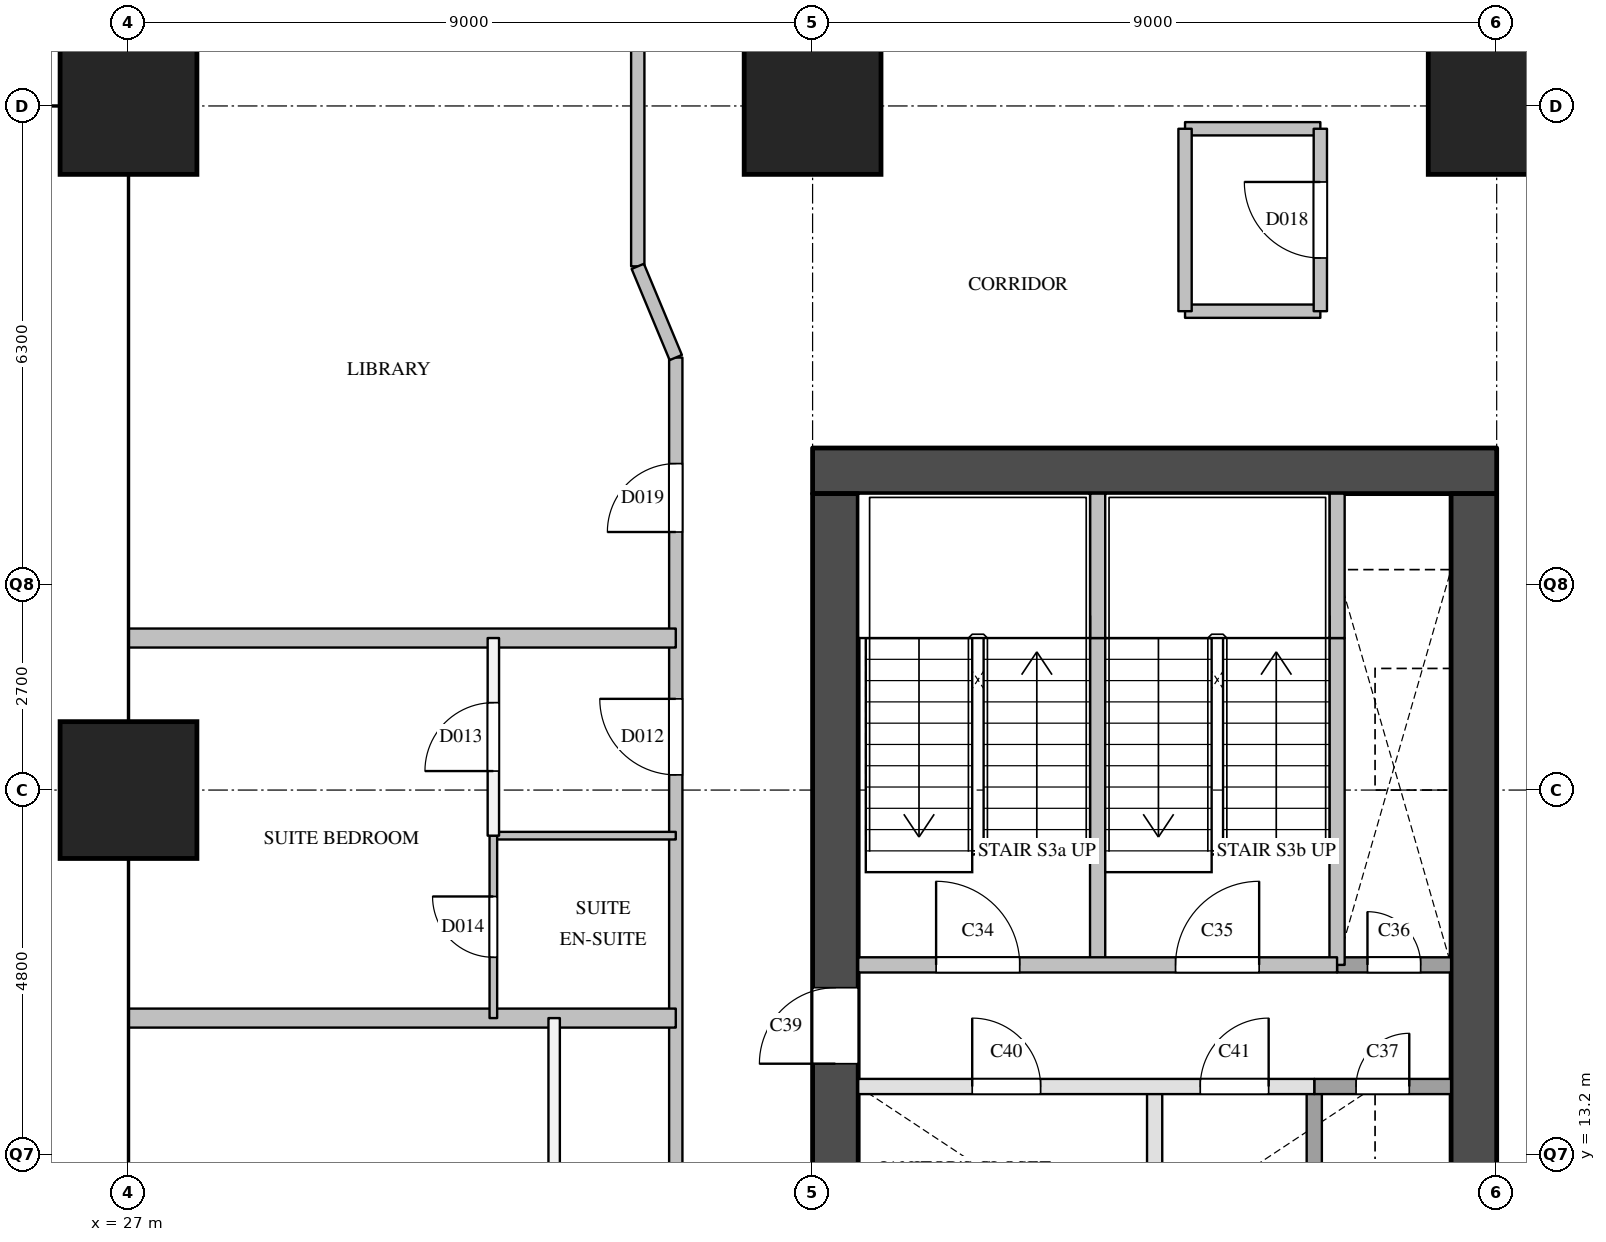
"""IFC4 building model, lengths in metres.
Left out: names, types, materials, properties, quantities, classifications, styles, units other than length and angle.
Written with IfcOpenShell. Run it as: python <this file> out.ifc"""

import sys

from ifc_helpers import new_model, si_unit, direction, frame, frame_2d, origin, origin_2d, place, context, subcontext, project, spatial, rectangle, extrude, element, fill, save


model = new_model("IFC4")
c1 = context("Model", 3, precision=1e-05, world=origin(), true_north=direction((0.0, 1.0)))
c2 = subcontext(c1, "Body", "Model", "MODEL_VIEW")
j1 = project(units=[si_unit("LENGTHUNIT", "METRE"), si_unit("PLANEANGLEUNIT", "RADIAN")], contexts=[c1])
p1 = place(None, origin())
s1 = spatial("IfcSite", under=j1, at=p1, CompositionType="ELEMENT")
p2 = place(p1, origin())
s2 = spatial("IfcBuilding", under=s1, at=p2, CompositionType="ELEMENT")
p3 = place(p2, frame((0.0, 0.0, 119.6)))
s3 = spatial("IfcBuildingStorey", under=s2, at=p3, CompositionType="ELEMENT", Elevation=119.6)
for number, where, z_axis, x_axis in (
    (1, (27.0, 18.0, 0.0), (0.0, 0.0, 1.0), (1.0, 0.0, 0.0)),
    (2, (27.0, 27.0, 0.0), (0.0, 0.0, 1.0), (1.0, 0.0, 0.0)),
    (3, (36.0, 27.0, 0.0), (0.0, 0.0, 1.0), (1.0, 0.0, 0.0)),
    (4, (45.0, 27.0, 0.0), (0.0, 0.0, 1.0), (1.0, 0.0, 0.0)),
):
    element("IfcColumn", number, at=place(p3, frame(where, z_axis=z_axis, x_axis=x_axis)), inside=s3, PredefinedType="COLUMN", context=c2, shape_type="SweptSolid", body=[
        extrude(rectangle(XDim=1.8, YDim=1.8, at=origin_2d()), origin(), (0.0, 0.0, 1.0), 3.8),
    ])
p4 = place(p3, frame((36.0, 22.2, 0.0), z_axis=(0.0, 0.0, 1.0), x_axis=(1.0, 0.0, 0.0)))
e5 = element("IfcWall", 5, at=p4, inside=s3, PredefinedType="SHEAR", context=c2, shape_type="SweptSolid", body=[
    extrude(rectangle(XDim=9.0, YDim=0.6, at=frame_2d((4.5, 0.0))), origin(), (0.0, 0.0, 1.0), 3.3),
])
p5 = place(p3, frame((36.3, 9.6, 0.0), z_axis=(0.0, 0.0, 1.0), x_axis=(0.0, 1.0, 0.0)))
e6 = element("IfcWall", 6, at=p5, inside=s3, PredefinedType="SHEAR", context=c2, shape_type="SweptSolid", body=[
    extrude(rectangle(XDim=12.3, YDim=0.6, at=frame_2d((6.15, 0.0))), origin(), (0.0, 0.0, 1.0), 3.3),
])
p6 = place(p5, frame((0.525, 0.0, 0.0)))
e7 = element("IfcOpeningElement", 7, at=p6, cuts=e6, PredefinedType="OPENING", context=c2, shape_type="SweptSolid", body=[
    extrude(rectangle(XDim=1.2, YDim=2.1, at=frame_2d((0.6, 1.05))), frame((0.0, 0.31, 0.0), z_axis=(0.0, -1.0, 0.0), x_axis=(1.0, 0.0, 0.0)), (0.0, 0.0, 1.0), 0.62),
])
p7 = place(p5, frame((4.8, 0.0, 0.0)))
e8 = element("IfcOpeningElement", 8, at=p7, cuts=e6, PredefinedType="OPENING", context=c2, shape_type="SweptSolid", body=[
    extrude(rectangle(XDim=1.0, YDim=2.1, at=frame_2d((0.5, 1.05))), frame((0.0, 0.31, 0.0), z_axis=(0.0, -1.0, 0.0), x_axis=(1.0, 0.0, 0.0)), (0.0, 0.0, 1.0), 0.62),
])
p8 = place(p3, frame((44.7, 9.6, 0.0), z_axis=(0.0, 0.0, 1.0), x_axis=(0.0, 1.0, 0.0)))
e9 = element("IfcWall", 9, at=p8, inside=s3, PredefinedType="SHEAR", context=c2, shape_type="SweptSolid", body=[
    extrude(rectangle(XDim=12.3, YDim=0.6, at=frame_2d((6.15, 0.0))), origin(), (0.0, 0.0, 1.0), 3.3),
])
p9 = place(p8, frame((0.8, 0.0, 0.0)))
e10 = element("IfcOpeningElement", 10, at=p9, cuts=e9, PredefinedType="OPENING", context=c2, shape_type="SweptSolid", body=[
    extrude(rectangle(XDim=0.7, YDim=2.1, at=frame_2d((0.35, 1.05))), frame((0.0, 0.31, 0.0), z_axis=(0.0, -1.0, 0.0), x_axis=(1.0, 0.0, 0.0)), (0.0, 0.0, 1.0), 0.62),
])
p10 = place(p3, frame((39.75, 15.7, 0.0), z_axis=(0.0, 0.0, 1.0), x_axis=(0.0, 1.0, 0.0)))
e11 = element("IfcWall", 11, at=p10, inside=s3, PredefinedType="SOLIDWALL", context=c2, shape_type="SweptSolid", body=[
    extrude(rectangle(XDim=4.3, YDim=0.2, at=frame_2d((2.15, 0.0))), origin(), (0.0, 0.0, 1.0), 3.3),
])
p11 = place(p3, frame((39.75, 20.0, 0.0), z_axis=(0.0, 0.0, 1.0), x_axis=(0.0, 1.0, 0.0)))
e12 = element("IfcWall", 12, at=p11, inside=s3, PredefinedType="SOLIDWALL", context=c2, shape_type="SweptSolid", body=[
    extrude(rectangle(XDim=1.9, YDim=0.2, at=frame_2d((0.95, 0.0))), origin(), (0.0, 0.0, 1.0), 3.3),
])
p12 = place(p3, frame((40.5, 11.9, 0.0), z_axis=(0.0, 0.0, 1.0), x_axis=(0.0, 1.0, 0.0)))
e13 = element("IfcWall", 13, at=p12, inside=s3, PredefinedType="PARTITIONING", context=c2, shape_type="SweptSolid", body=[
    extrude(rectangle(XDim=2.2, YDim=0.2, at=frame_2d((1.1, 0.0))), origin(), (0.0, 0.0, 1.0), 3.3),
])
p13 = place(p3, frame((42.6, 11.9, 0.0), z_axis=(0.0, 0.0, 1.0), x_axis=(0.0, 1.0, 0.0)))
e14 = element("IfcWall", 14, at=p13, inside=s3, PredefinedType="SOLIDWALL", context=c2, shape_type="SweptSolid", body=[
    extrude(rectangle(XDim=2.2, YDim=0.2, at=frame_2d((1.1, 0.0))), origin(), (0.0, 0.0, 1.0), 3.3),
])
p14 = place(p3, frame((42.9, 15.7, 0.0), z_axis=(0.0, 0.0, 1.0), x_axis=(0.0, 1.0, 0.0)))
e15 = element("IfcWall", 15, at=p14, inside=s3, PredefinedType="SOLIDWALL", context=c2, shape_type="SweptSolid", body=[
    extrude(rectangle(XDim=4.3, YDim=0.2, at=frame_2d((2.15, 0.0))), origin(), (0.0, 0.0, 1.0), 3.3),
])
p15 = place(p3, frame((42.9, 20.0, 0.0), z_axis=(0.0, 0.0, 1.0), x_axis=(0.0, 1.0, 0.0)))
e16 = element("IfcWall", 16, at=p15, inside=s3, PredefinedType="SOLIDWALL", context=c2, shape_type="SweptSolid", body=[
    extrude(rectangle(XDim=1.9, YDim=0.2, at=frame_2d((0.95, 0.0))), origin(), (0.0, 0.0, 1.0), 3.3),
])
p16 = place(p3, frame((36.6, 14.1, 0.0), z_axis=(0.0, 0.0, 1.0), x_axis=(1.0, 0.0, 0.0)))
e17 = element("IfcWall", 17, at=p16, inside=s3, PredefinedType="PARTITIONING", context=c2, shape_type="SweptSolid", body=[
    extrude(rectangle(XDim=6.0, YDim=0.2, at=frame_2d((3.0, 0.0))), origin(), (0.0, 0.0, 1.0), 3.3),
])
p17 = place(p16, frame((1.5, 0.0, 0.0)))
e18 = element("IfcOpeningElement", 18, at=p17, cuts=e17, PredefinedType="OPENING", context=c2, shape_type="SweptSolid", body=[
    extrude(rectangle(XDim=0.9, YDim=2.1, at=frame_2d((0.45, 1.05))), frame((0.0, 0.11, 0.0), z_axis=(0.0, -1.0, 0.0), x_axis=(1.0, 0.0, 0.0)), (0.0, 0.0, 1.0), 0.22),
])
p18 = place(p16, frame((4.5, 0.0, 0.0)))
e19 = element("IfcOpeningElement", 19, at=p18, cuts=e17, PredefinedType="OPENING", context=c2, shape_type="SweptSolid", body=[
    extrude(rectangle(XDim=0.9, YDim=2.1, at=frame_2d((0.45, 1.05))), frame((0.0, 0.11, 0.0), z_axis=(0.0, -1.0, 0.0), x_axis=(1.0, 0.0, 0.0)), (0.0, 0.0, 1.0), 0.22),
])
p19 = place(p3, frame((42.6, 14.1, 0.0), z_axis=(0.0, 0.0, 1.0), x_axis=(1.0, 0.0, 0.0)))
e20 = element("IfcWall", 20, at=p19, inside=s3, PredefinedType="SOLIDWALL", context=c2, shape_type="SweptSolid", body=[
    extrude(rectangle(XDim=1.8, YDim=0.2, at=frame_2d((0.9, 0.0))), origin(), (0.0, 0.0, 1.0), 3.3),
])
p20 = place(p19, frame((0.55, 0.0, 0.0)))
e21 = element("IfcOpeningElement", 21, at=p20, cuts=e20, PredefinedType="OPENING", context=c2, shape_type="SweptSolid", body=[
    extrude(rectangle(XDim=0.7, YDim=2.1, at=frame_2d((0.35, 1.05))), frame((0.0, 0.11, 0.0), z_axis=(0.0, -1.0, 0.0), x_axis=(1.0, 0.0, 0.0)), (0.0, 0.0, 1.0), 0.22),
])
p21 = place(p3, frame((42.9, 15.7, 0.0), z_axis=(0.0, 0.0, 1.0), x_axis=(1.0, 0.0, 0.0)))
e22 = element("IfcWall", 22, at=p21, inside=s3, PredefinedType="SOLIDWALL", context=c2, shape_type="SweptSolid", body=[
    extrude(rectangle(XDim=1.5, YDim=0.2, at=frame_2d((0.75, 0.0))), origin(), (0.0, 0.0, 1.0), 3.3),
])
p22 = place(p21, frame((0.4, 0.0, 0.0)))
e23 = element("IfcOpeningElement", 23, at=p22, cuts=e22, PredefinedType="OPENING", context=c2, shape_type="SweptSolid", body=[
    extrude(rectangle(XDim=0.7, YDim=2.1, at=frame_2d((0.35, 1.05))), frame((0.0, 0.11, 0.0), z_axis=(0.0, -1.0, 0.0), x_axis=(1.0, 0.0, 0.0)), (0.0, 0.0, 1.0), 0.22),
])
p23 = place(p3, frame((36.6, 15.7, 0.0), z_axis=(0.0, 0.0, 1.0), x_axis=(1.0, 0.0, 0.0)))
e24 = element("IfcWall", 24, at=p23, inside=s3, PredefinedType="SOLIDWALL", context=c2, shape_type="SweptSolid", body=[
    extrude(rectangle(XDim=6.3, YDim=0.2, at=frame_2d((3.15, 0.0))), origin(), (0.0, 0.0, 1.0), 3.3),
])
p24 = place(p23, frame((1.025, 0.0, 0.0)))
e25 = element("IfcOpeningElement", 25, at=p24, cuts=e24, PredefinedType="OPENING", context=c2, shape_type="SweptSolid", body=[
    extrude(rectangle(XDim=1.1, YDim=2.1, at=frame_2d((0.55, 1.05))), frame((0.0, 0.11, 0.0), z_axis=(0.0, -1.0, 0.0), x_axis=(1.0, 0.0, 0.0)), (0.0, 0.0, 1.0), 0.22),
])
p25 = place(p23, frame((4.175, 0.0, 0.0)))
e26 = element("IfcOpeningElement", 26, at=p25, cuts=e24, PredefinedType="OPENING", context=c2, shape_type="SweptSolid", body=[
    extrude(rectangle(XDim=1.1, YDim=2.1, at=frame_2d((0.55, 1.05))), frame((0.0, 0.11, 0.0), z_axis=(0.0, -1.0, 0.0), x_axis=(1.0, 0.0, 0.0)), (0.0, 0.0, 1.0), 0.22),
])
p26 = place(p3, frame((40.9, 24.3, 0.0), z_axis=(0.0, 0.0, 1.0), x_axis=(1.0, 0.0, 0.0)))
e27 = element("IfcWall", 27, at=p26, inside=s3, PredefinedType="PARTITIONING", context=c2, shape_type="SweptSolid", body=[
    extrude(rectangle(XDim=1.78, YDim=0.175, at=frame_2d((0.89, 0.0))), origin(), (0.0, 0.0, 1.0), 3.3),
])
p27 = place(p3, frame((40.9, 26.7, 0.0), z_axis=(0.0, 0.0, 1.0), x_axis=(1.0, 0.0, 0.0)))
e28 = element("IfcWall", 28, at=p27, inside=s3, PredefinedType="PARTITIONING", context=c2, shape_type="SweptSolid", body=[
    extrude(rectangle(XDim=1.78, YDim=0.175, at=frame_2d((0.89, 0.0))), origin(), (0.0, 0.0, 1.0), 2.3),
])
p28 = place(p3, frame((33.7, 24.89, 0.0), z_axis=(0.0, 0.0, 1.0), x_axis=(0.0, 1.0, 0.0)))
e29 = element("IfcWall", 29, at=p28, inside=s3, PredefinedType="PARTITIONING", context=c2, shape_type="SweptSolid", body=[
    extrude(rectangle(XDim=3.03, YDim=0.175, at=frame_2d((1.515, 0.0))), origin(), (0.0, 0.0, 1.0), 2.3),
])
p29 = place(p3, frame((34.2, 7.2, 0.0), z_axis=(0.0, 0.0, 1.0), x_axis=(0.0, 1.0, 0.0)))
e30 = element("IfcWall", 30, at=p29, inside=s3, PredefinedType="PARTITIONING", context=c2, shape_type="SweptSolid", body=[
    extrude(rectangle(XDim=16.49, YDim=0.175, at=frame_2d((8.245, 0.0))), origin(), (0.0, 0.0, 1.0), 3.3),
])
p30 = place(p29, frame((3.4, 0.0, 0.0)))
e31 = element("IfcOpeningElement", 31, at=p30, cuts=e30, PredefinedType="OPENING", context=c2, shape_type="SweptSolid", body=[
    extrude(rectangle(XDim=1.0, YDim=2.1, at=frame_2d((0.5, 1.05))), frame((0.0, 0.097, 0.0), z_axis=(0.0, -1.0, 0.0), x_axis=(1.0, 0.0, 0.0)), (0.0, 0.0, 1.0), 0.195),
])
p31 = place(p29, frame((11.0, 0.0, 0.0)))
e32 = element("IfcOpeningElement", 32, at=p31, cuts=e30, PredefinedType="OPENING", context=c2, shape_type="SweptSolid", body=[
    extrude(rectangle(XDim=1.0, YDim=2.1, at=frame_2d((0.5, 1.05))), frame((0.0, 0.097, 0.0), z_axis=(0.0, -1.0, 0.0), x_axis=(1.0, 0.0, 0.0)), (0.0, 0.0, 1.0), 0.195),
])
p32 = place(p29, frame((14.195, 0.0, 0.0)))
e33 = element("IfcOpeningElement", 33, at=p32, cuts=e30, PredefinedType="OPENING", context=c2, shape_type="SweptSolid", body=[
    extrude(rectangle(XDim=0.9, YDim=2.1, at=frame_2d((0.45, 1.05))), frame((0.0, 0.097, 0.0), z_axis=(0.0, -1.0, 0.0), x_axis=(1.0, 0.0, 0.0)), (0.0, 0.0, 1.0), 0.195),
])
p33 = place(p3, frame((40.9, 24.3, 0.0), z_axis=(0.0, 0.0, 1.0), x_axis=(0.0, 1.0, 0.0)))
e34 = element("IfcWall", 34, at=p33, inside=s3, PredefinedType="PARTITIONING", context=c2, shape_type="SweptSolid", body=[
    extrude(rectangle(XDim=2.4, YDim=0.175, at=frame_2d((1.2, 0.0))), origin(), (0.0, 0.0, 1.0), 2.3),
])
p34 = place(p3, frame((42.68, 24.3, 0.0), z_axis=(0.0, 0.0, 1.0), x_axis=(0.0, 1.0, 0.0)))
e35 = element("IfcWall", 35, at=p34, inside=s3, PredefinedType="PARTITIONING", context=c2, shape_type="SweptSolid", body=[
    extrude(rectangle(XDim=2.4, YDim=0.175, at=frame_2d((1.2, 0.0))), origin(), (0.0, 0.0, 1.0), 2.3),
])
p35 = place(p34, frame((0.7, 0.0, 0.0)))
e36 = element("IfcOpeningElement", 36, at=p35, cuts=e35, PredefinedType="OPENING", context=c2, shape_type="SweptSolid", body=[
    extrude(rectangle(XDim=1.0, YDim=2.1, at=frame_2d((0.5, 1.05))), frame((0.0, 0.097, 0.0), z_axis=(0.0, -1.0, 0.0), x_axis=(1.0, 0.0, 0.0)), (0.0, 0.0, 1.0), 0.195),
])
p36 = place(p3, frame((31.8, 17.4, 0.0), z_axis=(0.0, 0.0, 1.0), x_axis=(0.0, 1.0, 0.0)))
e37 = element("IfcWall", 37, at=p36, inside=s3, PredefinedType="PARTITIONING", context=c2, shape_type="SweptSolid", body=[
    extrude(rectangle(XDim=2.6, YDim=0.15, at=frame_2d((1.3, 0.0))), origin(), (0.0, 0.0, 1.0), 3.3),
])
p37 = place(p36, frame((0.85, 0.0, 0.0)))
e38 = element("IfcOpeningElement", 38, at=p37, cuts=e37, PredefinedType="OPENING", context=c2, shape_type="SweptSolid", body=[
    extrude(rectangle(XDim=0.9, YDim=2.1, at=frame_2d((0.45, 1.05))), frame((0.0, 0.085, 0.0), z_axis=(0.0, -1.0, 0.0), x_axis=(1.0, 0.0, 0.0)), (0.0, 0.0, 1.0), 0.17),
])
p38 = place(p3, frame((32.6, 2.4, 0.0), z_axis=(0.0, 0.0, 1.0), x_axis=(0.0, 1.0, 0.0)))
e39 = element("IfcWall", 39, at=p38, inside=s3, PredefinedType="PARTITIONING", context=c2, shape_type="SweptSolid", body=[
    extrude(rectangle(XDim=12.6, YDim=0.15, at=frame_2d((6.3, 0.0))), origin(), (0.0, 0.0, 1.0), 3.3),
])
p39 = place(p38, frame((5.85, 0.0, 0.0)))
e40 = element("IfcOpeningElement", 40, at=p39, cuts=e39, PredefinedType="OPENING", context=c2, shape_type="SweptSolid", body=[
    extrude(rectangle(XDim=0.9, YDim=2.1, at=frame_2d((0.45, 1.05))), frame((0.0, 0.085, 0.0), z_axis=(0.0, -1.0, 0.0), x_axis=(1.0, 0.0, 0.0)), (0.0, 0.0, 1.0), 0.17),
])
for number, where, z_axis, x_axis in (
    (41, (27.0, 15.0, 0.0), (0.0, 0.0, 1.0), (1.0, 0.0, 0.0)),
    (42, (27.0, 20.0, 0.0), (0.0, 0.0, 1.0), (1.0, 0.0, 0.0)),
):
    element("IfcWall", number, at=place(p3, frame(where, z_axis=z_axis, x_axis=x_axis)), inside=s3, PredefinedType="PARTITIONING", context=c2, shape_type="SweptSolid", body=[
        extrude(rectangle(XDim=7.2, YDim=0.25, at=frame_2d((3.6, 0.0))), origin(), (0.0, 0.0, 1.0), 2.3),
    ])
p40 = place(p3, frame((31.8, 17.4, 0.0), z_axis=(0.0, 0.0, 1.0), x_axis=(1.0, 0.0, 0.0)))
e43 = element("IfcWall", 43, at=p40, inside=s3, PredefinedType="PARTITIONING", context=c2, shape_type="SweptSolid", body=[
    extrude(rectangle(XDim=2.4, YDim=0.1, at=frame_2d((1.2, 0.0))), origin(), (0.0, 0.0, 1.0), 3.3),
])
p41 = place(p3, frame((31.8, 15.0, 0.0), z_axis=(0.0, 0.0, 1.0), x_axis=(0.0, 1.0, 0.0)))
e44 = element("IfcWall", 44, at=p41, inside=s3, PredefinedType="PARTITIONING", context=c2, shape_type="SweptSolid", body=[
    extrude(rectangle(XDim=2.4, YDim=0.1, at=frame_2d((1.2, 0.0))), origin(), (0.0, 0.0, 1.0), 3.3),
])
p42 = place(p41, frame((0.8, 0.0, 0.0)))
e45 = element("IfcOpeningElement", 45, at=p42, cuts=e44, PredefinedType="OPENING", context=c2, shape_type="SweptSolid", body=[
    extrude(rectangle(XDim=0.8, YDim=2.1, at=frame_2d((0.4, 1.05))), frame((0.0, 0.06, 0.0), z_axis=(0.0, -1.0, 0.0), x_axis=(1.0, 0.0, 0.0)), (0.0, 0.0, 1.0), 0.12),
])
p43 = place(p3, frame((34.2, 23.69, 0.0), z_axis=(0.0, 0.0, 1.0), x_axis=(-0.384628719983, 0.923071366561, 0.0)))
e46 = element("IfcWall", 46, at=p43, inside=s3, PredefinedType="PARTITIONING", context=c2, shape_type="SweptSolid", body=[
    extrude(rectangle(XDim=1.3, YDim=0.175, at=frame_2d((0.65, 0.0))), origin(), (0.0, 0.0, 1.0), 3.3),
])
p44 = place(p24, origin())
e47 = element("IfcDoor", 47, at=p44, inside=s3, OperationType="SINGLE_SWING_LEFT", PredefinedType="DOOR", context=c2, shape_type="SweptSolid", body=[
    extrude(rectangle(XDim=1.1, YDim=2.1, at=frame_2d((0.55, 1.05))), frame((0.0, 0.025, 0.0), z_axis=(0.0, -1.0, 0.0), x_axis=(1.0, 0.0, 0.0)), (0.0, 0.0, 1.0), 0.05),
])
fill(e25, e47)
p45 = place(p25, origin())
e48 = element("IfcDoor", 48, at=p45, inside=s3, OperationType="SINGLE_SWING_RIGHT", PredefinedType="DOOR", context=c2, shape_type="SweptSolid", body=[
    extrude(rectangle(XDim=1.1, YDim=2.1, at=frame_2d((0.55, 1.05))), frame((0.0, 0.025, 0.0), z_axis=(0.0, -1.0, 0.0), x_axis=(1.0, 0.0, 0.0)), (0.0, 0.0, 1.0), 0.05),
])
fill(e26, e48)
p46 = place(p22, origin())
e49 = element("IfcDoor", 49, at=p46, inside=s3, OperationType="SINGLE_SWING_LEFT", PredefinedType="DOOR", context=c2, shape_type="SweptSolid", body=[
    extrude(rectangle(XDim=0.7, YDim=2.1, at=frame_2d((0.35, 1.05))), frame((0.0, 0.025, 0.0), z_axis=(0.0, -1.0, 0.0), x_axis=(1.0, 0.0, 0.0)), (0.0, 0.0, 1.0), 0.05),
])
fill(e23, e49)
p47 = place(p20, origin())
e50 = element("IfcDoor", 50, at=p47, inside=s3, OperationType="SINGLE_SWING_RIGHT", PredefinedType="DOOR", context=c2, shape_type="SweptSolid", body=[
    extrude(rectangle(XDim=0.7, YDim=2.1, at=frame_2d((0.35, 1.05))), frame((0.0, 0.025, 0.0), z_axis=(0.0, -1.0, 0.0), x_axis=(1.0, 0.0, 0.0)), (0.0, 0.0, 1.0), 0.05),
])
fill(e21, e50)
p48 = place(p7, origin())
e51 = element("IfcDoor", 51, at=p48, inside=s3, OperationType="SINGLE_SWING_LEFT", PredefinedType="DOOR", context=c2, shape_type="SweptSolid", body=[
    extrude(rectangle(XDim=1.0, YDim=2.1, at=frame_2d((0.5, 1.05))), frame((0.0, 0.025, 0.0), z_axis=(0.0, -1.0, 0.0), x_axis=(1.0, 0.0, 0.0)), (0.0, 0.0, 1.0), 0.05),
])
fill(e8, e51)
p49 = place(p17, origin())
e52 = element("IfcDoor", 52, at=p49, inside=s3, OperationType="SINGLE_SWING_LEFT", PredefinedType="DOOR", context=c2, shape_type="SweptSolid", body=[
    extrude(rectangle(XDim=0.9, YDim=2.1, at=frame_2d((0.45, 1.05))), frame((0.0, 0.025, 0.0), z_axis=(0.0, -1.0, 0.0), x_axis=(1.0, 0.0, 0.0)), (0.0, 0.0, 1.0), 0.05),
])
fill(e18, e52)
p50 = place(p18, origin())
e53 = element("IfcDoor", 53, at=p50, inside=s3, OperationType="SINGLE_SWING_RIGHT", PredefinedType="DOOR", context=c2, shape_type="SweptSolid", body=[
    extrude(rectangle(XDim=0.9, YDim=2.1, at=frame_2d((0.45, 1.05))), frame((0.0, 0.025, 0.0), z_axis=(0.0, -1.0, 0.0), x_axis=(1.0, 0.0, 0.0)), (0.0, 0.0, 1.0), 0.05),
])
fill(e19, e53)
p51 = place(p31, origin())
e54 = element("IfcDoor", 54, at=p51, inside=s3, OperationType="SINGLE_SWING_RIGHT", PredefinedType="DOOR", context=c2, shape_type="SweptSolid", body=[
    extrude(rectangle(XDim=1.0, YDim=2.1, at=frame_2d((0.5, 1.05))), frame((0.0, 0.025, 0.0), z_axis=(0.0, -1.0, 0.0), x_axis=(1.0, 0.0, 0.0)), (0.0, 0.0, 1.0), 0.05),
])
fill(e32, e54)
p52 = place(p37, origin())
e55 = element("IfcDoor", 55, at=p52, inside=s3, OperationType="SINGLE_SWING_LEFT", PredefinedType="DOOR", context=c2, shape_type="SweptSolid", body=[
    extrude(rectangle(XDim=0.9, YDim=2.1, at=frame_2d((0.45, 1.05))), frame((0.0, 0.025, 0.0), z_axis=(0.0, -1.0, 0.0), x_axis=(1.0, 0.0, 0.0)), (0.0, 0.0, 1.0), 0.05),
])
fill(e38, e55)
p53 = place(p42, origin())
e56 = element("IfcDoor", 56, at=p53, inside=s3, OperationType="SINGLE_SWING_RIGHT", PredefinedType="DOOR", context=c2, shape_type="SweptSolid", body=[
    extrude(rectangle(XDim=0.8, YDim=2.1, at=frame_2d((0.4, 1.05))), frame((0.0, 0.025, 0.0), z_axis=(0.0, -1.0, 0.0), x_axis=(1.0, 0.0, 0.0)), (0.0, 0.0, 1.0), 0.05),
])
fill(e45, e56)
p54 = place(p35, origin())
e57 = element("IfcDoor", 57, at=p54, inside=s3, OperationType="SINGLE_SWING_RIGHT", PredefinedType="DOOR", context=c2, shape_type="SweptSolid", body=[
    extrude(rectangle(XDim=1.0, YDim=2.1, at=frame_2d((0.5, 1.05))), frame((0.0, 0.025, 0.0), z_axis=(0.0, -1.0, 0.0), x_axis=(1.0, 0.0, 0.0)), (0.0, 0.0, 1.0), 0.05),
])
fill(e36, e57)
p55 = place(p32, origin())
e58 = element("IfcDoor", 58, at=p55, inside=s3, OperationType="SINGLE_SWING_LEFT", PredefinedType="DOOR", context=c2, shape_type="SweptSolid", body=[
    extrude(rectangle(XDim=0.9, YDim=2.1, at=frame_2d((0.45, 1.05))), frame((0.0, 0.025, 0.0), z_axis=(0.0, -1.0, 0.0), x_axis=(1.0, 0.0, 0.0)), (0.0, 0.0, 1.0), 0.05),
])
fill(e33, e58)
save(model, sys.argv[1])
